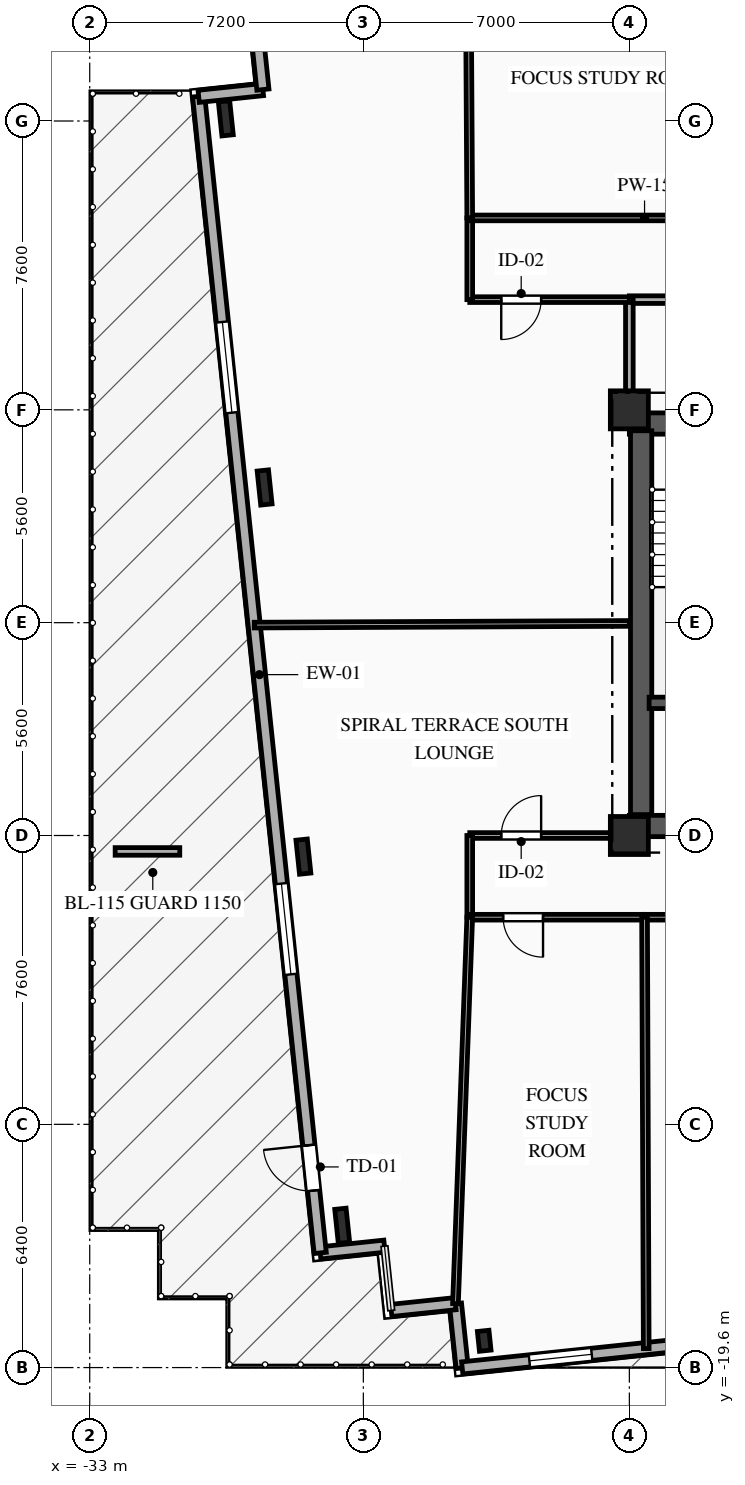
"""IFC4 building model, lengths in metres.
Left out: names, types, materials, properties, quantities, classifications, styles, units other than length and angle.
Written with IfcOpenShell. Run it as: python <this file> out.ifc"""

import sys

from ifc_helpers import new_model, si_unit, direction, frame, frame_2d, origin, origin_2d, place, context, subcontext, project, spatial, rectangle, i_section, extrude, element, fill, save


model = new_model("IFC4")
c1 = context("Model", 3, precision=1e-05, world=origin(), true_north=direction((0.0, 1.0)))
c2 = subcontext(c1, "Body", "Model", "MODEL_VIEW")
j1 = project(units=[si_unit("LENGTHUNIT", "METRE"), si_unit("PLANEANGLEUNIT", "RADIAN")], contexts=[c1])
p1 = place(None, origin())
s1 = spatial("IfcSite", under=j1, at=p1, CompositionType="ELEMENT")
p2 = place(p1, origin())
s2 = spatial("IfcBuilding", under=s1, at=p2, CompositionType="ELEMENT")
p3 = place(p2, frame((0.0, 0.0, 79.0)))
s3 = spatial("IfcBuildingStorey", under=s2, at=p3, CompositionType="ELEMENT", Elevation=79.0)
for number, where, z_axis, x_axis in (
    (1, (-18.8, -5.6, 0.0), (0.0, 0.0, 1.0), (1.0, 0.0, 0.0)),
    (2, (-18.8, 5.6, 0.0), (0.0, 0.0, 1.0), (1.0, 0.0, 0.0)),
):
    element("IfcColumn", number, at=place(p3, frame(where, z_axis=z_axis, x_axis=x_axis)), inside=s3, PredefinedType="COLUMN", context=c2, shape_type="SweptSolid", body=[
        extrude(rectangle(XDim=1.0, YDim=1.0, at=origin_2d()), origin(), (0.0, 0.0, 1.0), 3.35),
    ])
p4 = place(p3, frame((-22.619, -18.895, 0.0), z_axis=(0.0, 0.0, 1.0), x_axis=(0.994521895368, 0.104528463268, 0.0)))
e3 = element("IfcColumn", 3, at=p4, inside=s3, PredefinedType="COLUMN", context=c2, shape_type="SweptSolid", body=[
    extrude(i_section(OverallWidth=0.306, OverallDepth=0.524, WebThickness=0.021, FlangeThickness=0.04, FilletRadius=0.027, at=origin_2d()), origin(), (0.0, 0.0, 1.0), 3.35),
])
for number, where, z_axis, x_axis in (
    (4, (-29.419, 13.271, 0.0), (0.0, 0.0, 1.0), (0.995, 0.105, 0.0)),
    (5, (-28.398, 3.557, 0.0), (0.0, 0.0, 1.0), (0.995, 0.105, 0.0)),
    (6, (-27.377, -6.156, 0.0), (0.0, 0.0, 1.0), (0.995, 0.105, 0.0)),
    (7, (-26.356, -15.869, 0.0), (0.0, 0.0, 1.0), (0.995, 0.105, 0.0)),
):
    element("IfcColumn", number, at=place(p3, frame(where, z_axis=z_axis, x_axis=x_axis)), inside=s3, PredefinedType="COLUMN", context=c2, shape_type="SweptSolid", body=[
        extrude(i_section(OverallWidth=0.3, OverallDepth=0.9, WebThickness=0.019, FlangeThickness=0.035, FilletRadius=0.03, at=origin_2d()), origin(), (0.0, 0.0, 1.0), 3.35),
    ])
for number, where, z_axis, x_axis in (
    (8, (-23.198, -19.609, 0.0), (0.0, 0.0, 1.0), (-0.105, 0.995, 0.0)),
    (9, (-23.376, -17.919, 0.0), (0.0, 0.0, 1.0), (-0.995, -0.105, 0.0)),
):
    element("IfcWall", number, at=place(p3, frame(where, z_axis=z_axis, x_axis=x_axis)), inside=s3, PredefinedType="SOLIDWALL", context=c2, shape_type="SweptSolid", body=[
        extrude(rectangle(XDim=1.7, YDim=0.32, at=frame_2d((0.85, 0.0))), origin(), (0.0, 0.0, 1.0), 3.045),
    ])
p5 = place(p3, frame((-25.244, -16.406, 0.0), z_axis=(0.0, 0.0, 1.0), x_axis=(-0.994521177842, -0.104535289845, 0.0)))
e10 = element("IfcWall", 10, at=p5, inside=s3, PredefinedType="SOLIDWALL", context=c2, shape_type="SweptSolid", body=[
    extrude(rectangle(XDim=1.7, YDim=0.32, at=frame_2d((0.85, 0.0))), origin(), (0.0, 0.0, 1.0), 3.045),
])
p6 = place(p3, frame((-26.935, -16.583, 0.0), z_axis=(0.0, 0.0, 1.0), x_axis=(-0.104524887486, 0.994522271192, 0.0)))
e11 = element("IfcWall", 11, at=p6, inside=s3, PredefinedType="SOLIDWALL", context=c2, shape_type="SweptSolid", body=[
    extrude(rectangle(XDim=30.6, YDim=0.32, at=frame_2d((15.3, 0.0))), origin(), (0.0, 0.0, 1.0), 3.045),
])
p7 = place(p6, frame((1.65, 0.0, 0.0)))
e12 = element("IfcOpeningElement", 12, at=p7, cuts=e11, PredefinedType="OPENING", context=c2, shape_type="SweptSolid", body=[
    extrude(rectangle(XDim=1.2, YDim=2.2, at=frame_2d((0.6, 1.1))), frame((0.0, 0.17, 0.0), z_axis=(0.0, -1.0, 0.0), x_axis=(1.0, 0.0, 0.0)), (0.0, 0.0, 1.0), 0.34),
])
p8 = place(p6, frame((7.371, 0.0, 0.85)))
e13 = element("IfcOpeningElement", 13, at=p8, cuts=e11, PredefinedType="OPENING", context=c2, shape_type="SweptSolid", body=[
    extrude(rectangle(XDim=2.4, YDim=1.95, at=frame_2d((1.2, 0.975))), frame((0.0, 0.17, 0.0), z_axis=(0.0, -1.0, 0.0), x_axis=(1.0, 0.0, 0.0)), (0.0, 0.0, 1.0), 0.34),
])
p9 = place(p6, frame((22.231, 0.0, 0.85)))
e14 = element("IfcOpeningElement", 14, at=p9, cuts=e11, PredefinedType="OPENING", context=c2, shape_type="SweptSolid", body=[
    extrude(rectangle(XDim=2.4, YDim=1.95, at=frame_2d((1.2, 0.975))), frame((0.0, 0.17, 0.0), z_axis=(0.0, -1.0, 0.0), x_axis=(1.0, 0.0, 0.0)), (0.0, 0.0, 1.0), 0.34),
])
for number, where, z_axis, x_axis in (
    (15, (-30.133, 13.849, 0.0), (0.0, 0.0, 1.0), (0.995, 0.104, 0.0)),
    (16, (-28.443, 14.027, 0.0), (0.0, 0.0, 1.0), (-0.105, 0.995, 0.0)),
):
    element("IfcWall", number, at=place(p3, frame(where, z_axis=z_axis, x_axis=x_axis)), inside=s3, PredefinedType="SOLIDWALL", context=c2, shape_type="SweptSolid", body=[
        extrude(rectangle(XDim=1.7, YDim=0.32, at=frame_2d((0.85, 0.0))), origin(), (0.0, 0.0, 1.0), 3.045),
    ])
p10 = place(p3, frame((30.307, -13.986, 0.0), z_axis=(0.0, 0.0, 1.0), x_axis=(-0.994521628355, -0.104531003701, 0.0)))
e17 = element("IfcWall", 17, at=p10, inside=s3, PredefinedType="SOLIDWALL", context=c2, shape_type="SweptSolid", body=[
    extrude(rectangle(XDim=53.8, YDim=0.32, at=frame_2d((26.9, 0.0))), origin(), (0.0, 0.0, 1.0), 3.045),
])
p11 = place(p10, frame((11.144, 0.0, 0.85)))
e18 = element("IfcOpeningElement", 18, at=p11, cuts=e17, PredefinedType="OPENING", context=c2, shape_type="SweptSolid", body=[
    extrude(rectangle(XDim=1.65, YDim=1.85, at=frame_2d((0.825, 0.925))), frame((0.0, 0.17, 0.0), z_axis=(0.0, -1.0, 0.0), x_axis=(1.0, 0.0, 0.0)), (0.0, 0.0, 1.0), 0.34),
])
p12 = place(p10, frame((20.116, 0.0, 0.85)))
e19 = element("IfcOpeningElement", 19, at=p12, cuts=e17, PredefinedType="OPENING", context=c2, shape_type="SweptSolid", body=[
    extrude(rectangle(XDim=2.2, YDim=1.85, at=frame_2d((1.1, 0.925))), frame((0.0, 0.17, 0.0), z_axis=(0.0, -1.0, 0.0), x_axis=(1.0, 0.0, 0.0)), (0.0, 0.0, 1.0), 0.34),
])
p13 = place(p10, frame((29.363, 0.0, 0.85)))
e20 = element("IfcOpeningElement", 20, at=p13, cuts=e17, PredefinedType="OPENING", context=c2, shape_type="SweptSolid", body=[
    extrude(rectangle(XDim=2.2, YDim=1.85, at=frame_2d((1.1, 0.925))), frame((0.0, 0.17, 0.0), z_axis=(0.0, -1.0, 0.0), x_axis=(1.0, 0.0, 0.0)), (0.0, 0.0, 1.0), 0.34),
])
p14 = place(p10, frame((38.61, 0.0, 0.85)))
e21 = element("IfcOpeningElement", 21, at=p14, cuts=e17, PredefinedType="OPENING", context=c2, shape_type="SweptSolid", body=[
    extrude(rectangle(XDim=2.2, YDim=1.85, at=frame_2d((1.1, 0.925))), frame((0.0, 0.17, 0.0), z_axis=(0.0, -1.0, 0.0), x_axis=(1.0, 0.0, 0.0)), (0.0, 0.0, 1.0), 0.34),
])
p15 = place(p10, frame((45.85, 0.0, 0.85)))
e22 = element("IfcOpeningElement", 22, at=p15, cuts=e17, PredefinedType="OPENING", context=c2, shape_type="SweptSolid", body=[
    extrude(rectangle(XDim=1.65, YDim=1.85, at=frame_2d((0.825, 0.925))), frame((0.0, 0.17, 0.0), z_axis=(0.0, -1.0, 0.0), x_axis=(1.0, 0.0, 0.0)), (0.0, 0.0, 1.0), 0.34),
])
p16 = place(p10, frame((50.373, 0.0, 0.85)))
e23 = element("IfcOpeningElement", 23, at=p16, cuts=e17, PredefinedType="OPENING", context=c2, shape_type="SweptSolid", body=[
    extrude(rectangle(XDim=1.65, YDim=1.85, at=frame_2d((0.825, 0.925))), frame((0.0, 0.17, 0.0), z_axis=(0.0, -1.0, 0.0), x_axis=(1.0, 0.0, 0.0)), (0.0, 0.0, 1.0), 0.34),
])
p17 = place(p3, frame((-32.331, -6.019, 0.0), z_axis=(0.0, 0.0, 1.0), x_axis=(1.0, 0.0, 0.0)))
e24 = element("IfcWall", 24, at=p17, inside=s3, PredefinedType="USERDEFINED", context=c2, shape_type="SweptSolid", body=[
    extrude(rectangle(XDim=1.7, YDim=0.2, at=frame_2d((0.85, 0.0))), origin(), (0.0, 0.0, 1.0), 0.45),
])
p18 = place(p3, frame((-18.8, 5.24, 0.0), z_axis=(0.0, 0.0, 1.0), x_axis=(1.0, 0.0, 0.0)))
e25 = element("IfcWall", 25, at=p18, inside=s3, PredefinedType="SHEAR", context=c2, shape_type="SweptSolid", body=[
    extrude(rectangle(XDim=9.6, YDim=0.56, at=frame_2d((4.8, 0.0))), origin(), (0.0, 0.0, 1.0), 3.045),
])
p19 = place(p18, frame((1.55, 0.0, 0.0)))
e26 = element("IfcOpeningElement", 26, at=p19, cuts=e25, PredefinedType="OPENING", context=c2, shape_type="SweptSolid", body=[
    extrude(rectangle(XDim=1.1, YDim=2.15, at=frame_2d((0.55, 1.075))), frame((0.0, 0.29, 0.0), z_axis=(0.0, -1.0, 0.0), x_axis=(1.0, 0.0, 0.0)), (0.0, 0.0, 1.0), 0.58),
])
p20 = place(p18, frame((4.775, 0.0, 0.0)))
e27 = element("IfcOpeningElement", 27, at=p20, cuts=e25, PredefinedType="OPENING", context=c2, shape_type="SweptSolid", body=[
    extrude(rectangle(XDim=1.05, YDim=2.1, at=frame_2d((0.525, 1.05))), frame((0.0, 0.29, 0.0), z_axis=(0.0, -1.0, 0.0), x_axis=(1.0, 0.0, 0.0)), (0.0, 0.0, 1.0), 0.58),
])
p21 = place(p3, frame((-18.8, -5.35, 0.0), z_axis=(0.0, 0.0, 1.0), x_axis=(1.0, 0.0, 0.0)))
e28 = element("IfcWall", 28, at=p21, inside=s3, PredefinedType="SHEAR", context=c2, shape_type="SweptSolid", body=[
    extrude(rectangle(XDim=9.6, YDim=0.56, at=frame_2d((4.8, 0.0))), origin(), (0.0, 0.0, 1.0), 3.045),
])
p22 = place(p21, frame((1.05, 0.0, 0.0)))
e29 = element("IfcOpeningElement", 29, at=p22, cuts=e28, PredefinedType="OPENING", context=c2, shape_type="SweptSolid", body=[
    extrude(rectangle(XDim=0.9, YDim=2.1, at=frame_2d((0.45, 1.05))), frame((0.0, 0.29, 0.0), z_axis=(0.0, -1.0, 0.0), x_axis=(1.0, 0.0, 0.0)), (0.0, 0.0, 1.0), 0.58),
])
p23 = place(p3, frame((-18.49, -5.05, 0.0), z_axis=(0.0, 0.0, 1.0), x_axis=(0.0, 1.0, 0.0)))
e30 = element("IfcWall", 30, at=p23, inside=s3, PredefinedType="SHEAR", context=c2, shape_type="SweptSolid", body=[
    extrude(rectangle(XDim=10.1, YDim=0.56, at=frame_2d((5.05, 0.0))), origin(), (0.0, 0.0, 1.0), 3.045),
])
p24 = place(p3, frame((-18.28, -2.11, 0.0), z_axis=(0.0, 0.0, 1.0), x_axis=(1.0, 0.0, 0.0)))
e31 = element("IfcWall", 31, at=p24, inside=s3, PredefinedType="SHEAR", context=c2, shape_type="SweptSolid", body=[
    extrude(rectangle(XDim=3.18, YDim=0.3, at=frame_2d((1.59, 0.0))), origin(), (0.0, 0.0, 1.0), 3.045),
])
p25 = place(p3, frame((-12.0, 8.5, 0.0), z_axis=(0.0, 0.0, 1.0), x_axis=(-1.0, 0.0, 0.0)))
e32 = element("IfcWall", 32, at=p25, inside=s3, PredefinedType="PARTITIONING", context=c2, shape_type="SweptSolid", body=[
    extrude(rectangle(XDim=6.8, YDim=0.2, at=frame_2d((3.4, 0.0))), origin(), (0.0, 0.0, 1.0), 3.045),
])
p26 = place(p25, frame((1.715, 0.0, 0.0)))
e33 = element("IfcOpeningElement", 33, at=p26, cuts=e32, PredefinedType="OPENING", context=c2, shape_type="SweptSolid", body=[
    extrude(rectangle(XDim=1.1, YDim=2.15, at=frame_2d((0.55, 1.075))), frame((0.0, 0.11, 0.0), z_axis=(0.0, -1.0, 0.0), x_axis=(1.0, 0.0, 0.0)), (0.0, 0.0, 1.0), 0.22),
])
p27 = place(p3, frame((-18.8, 8.5, 0.0), z_axis=(0.0, 0.0, 1.0), x_axis=(0.0, -1.0, 0.0)))
e34 = element("IfcWall", 34, at=p27, inside=s3, PredefinedType="PARTITIONING", context=c2, shape_type="SweptSolid", body=[
    extrude(rectangle(XDim=2.9, YDim=0.2, at=frame_2d((1.45, 0.0))), origin(), (0.0, 0.0, 1.0), 2.53),
])
p28 = place(p3, frame((-18.8, 8.5, 0.0), z_axis=(0.0, 0.0, 1.0), x_axis=(-1.0, 0.0, 0.0)))
e35 = element("IfcWall", 35, at=p28, inside=s3, PredefinedType="PARTITIONING", context=c2, shape_type="SweptSolid", body=[
    extrude(rectangle(XDim=4.2, YDim=0.15, at=frame_2d((2.1, 0.0))), origin(), (0.0, 0.0, 1.0), 3.045),
])
p29 = place(p28, frame((2.321, 0.0, 0.0)))
e36 = element("IfcOpeningElement", 36, at=p29, cuts=e35, PredefinedType="OPENING", context=c2, shape_type="SweptSolid", body=[
    extrude(rectangle(XDim=1.05, YDim=2.15, at=frame_2d((0.525, 1.075))), frame((0.0, 0.085, 0.0), z_axis=(0.0, -1.0, 0.0), x_axis=(1.0, 0.0, 0.0)), (0.0, 0.0, 1.0), 0.17),
])
p30 = place(p3, frame((-23.0, 8.5, 0.0), z_axis=(0.0, 0.0, 1.0), x_axis=(0.0, 1.0, 0.0)))
e37 = element("IfcWall", 37, at=p30, inside=s3, PredefinedType="PARTITIONING", context=c2, shape_type="SweptSolid", body=[
    extrude(rectangle(XDim=2.15, YDim=0.15, at=frame_2d((1.075, 0.0))), origin(), (0.0, 0.0, 1.0), 3.045),
])
p31 = place(p3, frame((-23.0, 10.65, 0.0), z_axis=(0.0, 0.0, 1.0), x_axis=(1.0, 0.0, 0.0)))
e38 = element("IfcWall", 38, at=p31, inside=s3, PredefinedType="PARTITIONING", context=c2, shape_type="SweptSolid", body=[
    extrude(rectangle(XDim=9.2, YDim=0.15, at=frame_2d((4.6, 0.0))), origin(), (0.0, 0.0, 1.0), 3.045),
])
p32 = place(p31, frame((6.696, 0.0, 0.0)))
e39 = element("IfcOpeningElement", 39, at=p32, cuts=e38, PredefinedType="OPENING", context=c2, shape_type="SweptSolid", body=[
    extrude(rectangle(XDim=1.05, YDim=2.15, at=frame_2d((0.525, 1.075))), frame((0.0, 0.085, 0.0), z_axis=(0.0, -1.0, 0.0), x_axis=(1.0, 0.0, 0.0)), (0.0, 0.0, 1.0), 0.17),
])
p33 = place(p3, frame((-23.0, -5.6, 0.0), z_axis=(0.0, 0.0, 1.0), x_axis=(1.0, 0.0, 0.0)))
e40 = element("IfcWall", 40, at=p33, inside=s3, PredefinedType="PARTITIONING", context=c2, shape_type="SweptSolid", body=[
    extrude(rectangle(XDim=4.2, YDim=0.15, at=frame_2d((2.1, 0.0))), origin(), (0.0, 0.0, 1.0), 3.045),
])
p34 = place(p33, frame((0.829, 0.0, 0.0)))
e41 = element("IfcOpeningElement", 41, at=p34, cuts=e40, PredefinedType="OPENING", context=c2, shape_type="SweptSolid", body=[
    extrude(rectangle(XDim=1.05, YDim=2.15, at=frame_2d((0.525, 1.075))), frame((0.0, 0.085, 0.0), z_axis=(0.0, -1.0, 0.0), x_axis=(1.0, 0.0, 0.0)), (0.0, 0.0, 1.0), 0.17),
])
p35 = place(p3, frame((-23.0, -7.75, 0.0), z_axis=(0.0, 0.0, 1.0), x_axis=(0.0, 1.0, 0.0)))
e42 = element("IfcWall", 42, at=p35, inside=s3, PredefinedType="PARTITIONING", context=c2, shape_type="SweptSolid", body=[
    extrude(rectangle(XDim=2.15, YDim=0.15, at=frame_2d((1.075, 0.0))), origin(), (0.0, 0.0, 1.0), 2.7),
])
p36 = place(p3, frame((-18.4, -7.75, 0.0), z_axis=(0.0, 0.0, 1.0), x_axis=(-1.0, 0.0, 0.0)))
e43 = element("IfcWall", 43, at=p36, inside=s3, PredefinedType="PARTITIONING", context=c2, shape_type="SweptSolid", body=[
    extrude(rectangle(XDim=4.6, YDim=0.15, at=frame_2d((2.3, 0.0))), origin(), (0.0, 0.0, 1.0), 3.045),
])
p37 = place(p36, frame((2.671, 0.0, 0.0)))
e44 = element("IfcOpeningElement", 44, at=p37, cuts=e43, PredefinedType="OPENING", context=c2, shape_type="SweptSolid", body=[
    extrude(rectangle(XDim=1.05, YDim=2.15, at=frame_2d((0.525, 1.075))), frame((0.0, 0.085, 0.0), z_axis=(0.0, -1.0, 0.0), x_axis=(1.0, 0.0, 0.0)), (0.0, 0.0, 1.0), 0.17),
])
p38 = place(p3, frame((-13.8, -7.75, 0.0), z_axis=(0.0, 0.0, 1.0), x_axis=(-1.0, 0.0, 0.0)))
e45 = element("IfcWall", 45, at=p38, inside=s3, PredefinedType="PARTITIONING", context=c2, shape_type="SweptSolid", body=[
    extrude(rectangle(XDim=4.6, YDim=0.15, at=frame_2d((2.3, 0.0))), origin(), (0.0, 0.0, 1.0), 3.045),
])
p39 = place(p38, frame((0.879, 0.0, 0.0)))
e46 = element("IfcOpeningElement", 46, at=p39, cuts=e45, PredefinedType="OPENING", context=c2, shape_type="SweptSolid", body=[
    extrude(rectangle(XDim=1.05, YDim=2.15, at=frame_2d((0.525, 1.075))), frame((0.0, 0.085, 0.0), z_axis=(0.0, -1.0, 0.0), x_axis=(1.0, 0.0, 0.0)), (0.0, 0.0, 1.0), 0.17),
])
p40 = place(p3, frame((-28.671, -0.064, 0.0), z_axis=(0.0, 0.0, 1.0), x_axis=(0.999990089865, 0.004451985263, 0.0)))
e47 = element("IfcWall", 47, at=p40, inside=s3, PredefinedType="PARTITIONING", context=c2, shape_type="SweptSolid", body=[
    extrude(rectangle(XDim=9.871, YDim=0.15, at=frame_2d((4.936, 0.0))), origin(), (0.0, 0.0, 1.0), 3.045),
])
p41 = place(p3, frame((-23.0, -7.75, 0.0), z_axis=(0.0, 0.0, 1.0), x_axis=(-0.036924695214, -0.999318050914, 0.0)))
e48 = element("IfcWall", 48, at=p41, inside=s3, PredefinedType="PARTITIONING", context=c2, shape_type="SweptSolid", body=[
    extrude(rectangle(XDim=10.176, YDim=0.15, at=frame_2d((5.088, 0.0))), origin(), (0.0, 0.0, 1.0), 3.045),
])
p42 = place(p3, frame((-23.044, 18.013, 0.0), z_axis=(0.0, 0.0, 1.0), x_axis=(0.005968459246, -0.999982188588, 0.0)))
e49 = element("IfcWall", 49, at=p42, inside=s3, PredefinedType="PARTITIONING", context=c2, shape_type="SweptSolid", body=[
    extrude(rectangle(XDim=7.363, YDim=0.15, at=frame_2d((3.682, 0.0))), origin(), (0.0, 0.0, 1.0), 3.045),
])
p43 = place(p3, frame((-18.4, -7.75, 0.0), z_axis=(0.0, 0.0, 1.0), x_axis=(0.003850096217, -0.999992588352, 0.0)))
e50 = element("IfcWall", 50, at=p43, inside=s3, PredefinedType="PARTITIONING", context=c2, shape_type="SweptSolid", body=[
    extrude(rectangle(XDim=11.351, YDim=0.15, at=frame_2d((5.675, 0.0))), origin(), (0.0, 0.0, 1.0), 3.045),
])
p44 = place(p7, origin())
e51 = element("IfcDoor", 51, at=p44, inside=s3, OperationType="SINGLE_SWING_RIGHT", PredefinedType="DOOR", context=c2, shape_type="SweptSolid", body=[
    extrude(rectangle(XDim=1.2, YDim=2.2, at=frame_2d((0.6, 1.1))), frame((0.0, 0.025, 0.0), z_axis=(0.0, -1.0, 0.0), x_axis=(1.0, 0.0, 0.0)), (0.0, 0.0, 1.0), 0.05),
])
fill(e12, e51)
p45 = place(p8, origin())
e52 = element("IfcWindow", 52, at=p45, inside=s3, PartitioningType="SINGLE_PANEL", PredefinedType="WINDOW", context=c2, shape_type="SweptSolid", body=[
    extrude(rectangle(XDim=2.4, YDim=1.95, at=frame_2d((1.2, 0.975))), frame((0.0, 0.03, 0.0), z_axis=(0.0, -1.0, 0.0), x_axis=(1.0, 0.0, 0.0)), (0.0, 0.0, 1.0), 0.06),
])
fill(e13, e52)
p46 = place(p9, origin())
e53 = element("IfcWindow", 53, at=p46, inside=s3, PartitioningType="SINGLE_PANEL", PredefinedType="WINDOW", context=c2, shape_type="SweptSolid", body=[
    extrude(rectangle(XDim=2.4, YDim=1.95, at=frame_2d((1.2, 0.975))), frame((0.0, 0.03, 0.0), z_axis=(0.0, -1.0, 0.0), x_axis=(1.0, 0.0, 0.0)), (0.0, 0.0, 1.0), 0.06),
])
fill(e14, e53)
p47 = place(p16, origin())
e54 = element("IfcWindow", 54, at=p47, inside=s3, PartitioningType="SINGLE_PANEL", PredefinedType="WINDOW", context=c2, shape_type="SweptSolid", body=[
    extrude(rectangle(XDim=1.65, YDim=1.85, at=frame_2d((0.825, 0.925))), frame((0.0, 0.03, 0.0), z_axis=(0.0, -1.0, 0.0), x_axis=(1.0, 0.0, 0.0)), (0.0, 0.0, 1.0), 0.06),
])
fill(e23, e54)
p48 = place(p29, origin())
e55 = element("IfcDoor", 55, at=p48, inside=s3, OperationType="SINGLE_SWING_RIGHT", PredefinedType="DOOR", context=c2, shape_type="SweptSolid", body=[
    extrude(rectangle(XDim=1.05, YDim=2.15, at=frame_2d((0.525, 1.075))), frame((0.0, 0.025, 0.0), z_axis=(0.0, -1.0, 0.0), x_axis=(1.0, 0.0, 0.0)), (0.0, 0.0, 1.0), 0.05),
])
fill(e36, e55)
p49 = place(p34, origin())
e56 = element("IfcDoor", 56, at=p49, inside=s3, OperationType="SINGLE_SWING_RIGHT", PredefinedType="DOOR", context=c2, shape_type="SweptSolid", body=[
    extrude(rectangle(XDim=1.05, YDim=2.15, at=frame_2d((0.525, 1.075))), frame((0.0, 0.025, 0.0), z_axis=(0.0, -1.0, 0.0), x_axis=(1.0, 0.0, 0.0)), (0.0, 0.0, 1.0), 0.05),
])
fill(e41, e56)
p50 = place(p37, origin())
e57 = element("IfcDoor", 57, at=p50, inside=s3, OperationType="SINGLE_SWING_LEFT", PredefinedType="DOOR", context=c2, shape_type="SweptSolid", body=[
    extrude(rectangle(XDim=1.05, YDim=2.15, at=frame_2d((0.525, 1.075))), frame((0.0, 0.025, 0.0), z_axis=(0.0, -1.0, 0.0), x_axis=(1.0, 0.0, 0.0)), (0.0, 0.0, 1.0), 0.05),
])
fill(e44, e57)
save(model, sys.argv[1])
